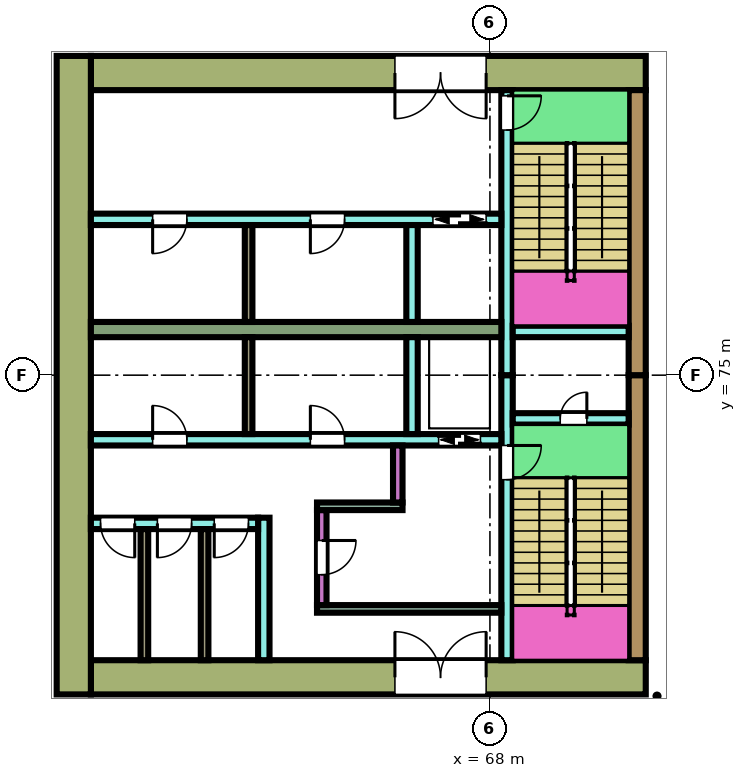
"""IFC4 building model, lengths in metres.
Left out: names, types, materials, properties, quantities, classifications, styles, units other than length and angle.
Written with IfcOpenShell. Run it as: python <this file> out.ifc"""

import sys

from ifc_helpers import new_model, si_unit, direction, frame, frame_2d, origin, place, context, subcontext, project, spatial, rectangle, extrude, element, fill, save


model = new_model("IFC4")
c1 = context("Model", 3, precision=1e-05, world=origin(), true_north=direction((0.0, 1.0)))
c2 = subcontext(c1, "Body", "Model", "MODEL_VIEW")
j1 = project(units=[si_unit("LENGTHUNIT", "METRE"), si_unit("PLANEANGLEUNIT", "RADIAN")], contexts=[c1])
p1 = place(None, origin())
s1 = spatial("IfcSite", under=j1, at=p1, CompositionType="ELEMENT")
p2 = place(p1, origin())
s2 = spatial("IfcBuilding", under=s1, at=p2, CompositionType="ELEMENT")
p3 = place(p2, frame((0.0, 0.0, -9.0)))
s3 = spatial("IfcBuildingStorey", under=s2, at=p3, CompositionType="ELEMENT", Elevation=-9.0)
p4 = place(p3, frame((72.1, 67.05, 0.0), z_axis=(0.0, 0.0, 1.0), x_axis=(-1.0, 0.0, 0.0)))
e1 = element("IfcWall", 1, at=p4, inside=s3, PredefinedType="SHEAR", context=c2, shape_type="SweptSolid", body=[
    extrude(rectangle(XDim=14.6, YDim=0.9, at=frame_2d((7.3, 0.0))), origin(), (0.0, 0.0, 1.0), 4.1),
])
p5 = place(p4, frame((4.2, 0.0, 0.0)))
e2 = element("IfcOpeningElement", 2, at=p5, cuts=e1, PredefinedType="OPENING", context=c2, shape_type="SweptSolid", body=[
    extrude(rectangle(XDim=2.4, YDim=2.4, at=frame_2d((1.2, 1.2))), frame((0.0, 0.46, 0.0), z_axis=(0.0, -1.0, 0.0), x_axis=(1.0, 0.0, 0.0)), (0.0, 0.0, 1.0), 0.92),
])
p6 = place(p3, frame((72.1, 82.95, 0.0), z_axis=(0.0, 0.0, 1.0), x_axis=(-1.0, 0.0, 0.0)))
e3 = element("IfcWall", 3, at=p6, inside=s3, PredefinedType="SHEAR", context=c2, shape_type="SweptSolid", body=[
    extrude(rectangle(XDim=14.6, YDim=0.9, at=frame_2d((7.3, 0.0))), origin(), (0.0, 0.0, 1.0), 4.1),
])
p7 = place(p6, frame((4.2, 0.0, 0.0)))
e4 = element("IfcOpeningElement", 4, at=p7, cuts=e3, PredefinedType="OPENING", context=c2, shape_type="SweptSolid", body=[
    extrude(rectangle(XDim=2.4, YDim=2.4, at=frame_2d((1.2, 1.2))), frame((0.0, 0.46, 0.0), z_axis=(0.0, -1.0, 0.0), x_axis=(1.0, 0.0, 0.0)), (0.0, 0.0, 1.0), 0.92),
])
for number, where, z_axis, x_axis in (
    (5, (71.875, 75.0, 0.0), (0.0, 0.0, 1.0), (0.0, -1.0, 0.0)),
    (6, (71.875, 82.5, 0.0), (0.0, 0.0, 1.0), (0.0, -1.0, 0.0)),
):
    element("IfcWall", number, at=place(p3, frame(where, z_axis=z_axis, x_axis=x_axis)), inside=s3, PredefinedType="SHEAR", context=c2, shape_type="SweptSolid", body=[
        extrude(rectangle(XDim=7.5, YDim=0.45, at=frame_2d((3.75, 0.0))), origin(), (0.0, 0.0, 1.0), 4.1),
    ])
p8 = place(p3, frame((57.05, 83.4, 0.0), z_axis=(0.0, 0.0, 1.0), x_axis=(0.0, -1.0, 0.0)))
e7 = element("IfcWall", 7, at=p8, inside=s3, PredefinedType="SHEAR", context=c2, shape_type="SweptSolid", body=[
    extrude(rectangle(XDim=16.8, YDim=0.9, at=frame_2d((8.4, 0.0))), origin(), (0.0, 0.0, 1.0), 4.1),
])
p9 = place(p3, frame((68.45, 75.0, 0.0), z_axis=(0.0, 0.0, 1.0), x_axis=(0.0, -1.0, 0.0)))
e8 = element("IfcWall", 8, at=p9, inside=s3, PredefinedType="SHEAR", context=c2, shape_type="SweptSolid", body=[
    extrude(rectangle(XDim=7.5, YDim=0.3, at=frame_2d((3.75, 0.0))), origin(), (0.0, 0.0, 1.0), 4.1),
])
p10 = place(p9, frame((1.85, 0.0, 0.0)))
e9 = element("IfcOpeningElement", 9, at=p10, cuts=e8, PredefinedType="OPENING", context=c2, shape_type="SweptSolid", body=[
    extrude(rectangle(XDim=0.9, YDim=2.1, at=frame_2d((0.45, 1.05))), frame((0.0, 0.16, 0.0), z_axis=(0.0, -1.0, 0.0), x_axis=(1.0, 0.0, 0.0)), (0.0, 0.0, 1.0), 0.32),
])
p11 = place(p3, frame((68.45, 82.5, 0.0), z_axis=(0.0, 0.0, 1.0), x_axis=(0.0, -1.0, 0.0)))
e10 = element("IfcWall", 10, at=p11, inside=s3, PredefinedType="SHEAR", context=c2, shape_type="SweptSolid", body=[
    extrude(rectangle(XDim=7.5, YDim=0.3, at=frame_2d((3.75, 0.0))), origin(), (0.0, 0.0, 1.0), 4.1),
])
p12 = place(p11, frame((0.15, 0.0, 0.0)))
e11 = element("IfcOpeningElement", 11, at=p12, cuts=e10, PredefinedType="OPENING", context=c2, shape_type="SweptSolid", body=[
    extrude(rectangle(XDim=0.9, YDim=2.1, at=frame_2d((0.45, 1.05))), frame((0.0, 0.16, 0.0), z_axis=(0.0, -1.0, 0.0), x_axis=(1.0, 0.0, 0.0)), (0.0, 0.0, 1.0), 0.32),
])
p13 = place(p3, frame((71.65, 73.85, 0.0), z_axis=(0.0, 0.0, 1.0), x_axis=(-1.0, 0.0, 0.0)))
e12 = element("IfcWall", 12, at=p13, inside=s3, PredefinedType="SHEAR", context=c2, shape_type="SweptSolid", body=[
    extrude(rectangle(XDim=3.05, YDim=0.3, at=frame_2d((1.525, 0.0))), origin(), (0.0, 0.0, 1.0), 4.1),
])
p14 = place(p13, frame((1.1, 0.0, 0.0)))
e13 = element("IfcOpeningElement", 13, at=p14, cuts=e12, PredefinedType="OPENING", context=c2, shape_type="SweptSolid", body=[
    extrude(rectangle(XDim=0.7, YDim=2.0, at=frame_2d((0.35, 1.0))), frame((0.0, 0.16, 0.0), z_axis=(0.0, -1.0, 0.0), x_axis=(1.0, 0.0, 0.0)), (0.0, 0.0, 1.0), 0.32),
])
p15 = place(p3, frame((71.65, 76.15, 0.0), z_axis=(0.0, 0.0, 1.0), x_axis=(-1.0, 0.0, 0.0)))
e14 = element("IfcWall", 14, at=p15, inside=s3, PredefinedType="SHEAR", context=c2, shape_type="SweptSolid", body=[
    extrude(rectangle(XDim=3.05, YDim=0.3, at=frame_2d((1.525, 0.0))), origin(), (0.0, 0.0, 1.0), 4.1),
])
p16 = place(p3, frame((68.3, 73.3, 0.0), z_axis=(0.0, 0.0, 1.0), x_axis=(-1.0, 0.0, 0.0)))
e15 = element("IfcWall", 15, at=p16, inside=s3, PredefinedType="SHEAR", context=c2, shape_type="SweptSolid", body=[
    extrude(rectangle(XDim=10.8, YDim=0.3, at=frame_2d((5.4, 0.0))), origin(), (0.0, 0.0, 1.0), 4.1),
])
p17 = place(p16, frame((0.55, 0.0, 0.0)))
e16 = element("IfcOpeningElement", 16, at=p17, cuts=e15, PredefinedType="OPENING", context=c2, shape_type="SweptSolid", body=[
    extrude(rectangle(XDim=1.1, YDim=2.1, at=frame_2d((0.55, 1.05))), frame((0.0, 0.16, 0.0), z_axis=(0.0, -1.0, 0.0), x_axis=(1.0, 0.0, 0.0)), (0.0, 0.0, 1.0), 0.32),
])
p18 = place(p16, frame((4.125, 0.0, 0.0)))
e17 = element("IfcOpeningElement", 17, at=p18, cuts=e15, PredefinedType="OPENING", context=c2, shape_type="SweptSolid", body=[
    extrude(rectangle(XDim=0.9, YDim=2.1, at=frame_2d((0.45, 1.05))), frame((0.0, 0.16, 0.0), z_axis=(0.0, -1.0, 0.0), x_axis=(1.0, 0.0, 0.0)), (0.0, 0.0, 1.0), 0.32),
])
p19 = place(p16, frame((8.275, 0.0, 0.0)))
e18 = element("IfcOpeningElement", 18, at=p19, cuts=e15, PredefinedType="OPENING", context=c2, shape_type="SweptSolid", body=[
    extrude(rectangle(XDim=0.9, YDim=2.1, at=frame_2d((0.45, 1.05))), frame((0.0, 0.16, 0.0), z_axis=(0.0, -1.0, 0.0), x_axis=(1.0, 0.0, 0.0)), (0.0, 0.0, 1.0), 0.32),
])
p20 = place(p3, frame((68.3, 76.2, 0.0), z_axis=(0.0, 0.0, 1.0), x_axis=(-1.0, 0.0, 0.0)))
e19 = element("IfcWall", 19, at=p20, inside=s3, PredefinedType="SHEAR", context=c2, shape_type="SweptSolid", body=[
    extrude(rectangle(XDim=10.8, YDim=0.4, at=frame_2d((5.4, 0.0))), origin(), (0.0, 0.0, 1.0), 4.1),
])
p21 = place(p3, frame((68.3, 79.1, 0.0), z_axis=(0.0, 0.0, 1.0), x_axis=(-1.0, 0.0, 0.0)))
e20 = element("IfcWall", 20, at=p21, inside=s3, PredefinedType="SHEAR", context=c2, shape_type="SweptSolid", body=[
    extrude(rectangle(XDim=10.8, YDim=0.3, at=frame_2d((5.4, 0.0))), origin(), (0.0, 0.0, 1.0), 4.1),
])
p22 = place(p21, frame((0.4, 0.0, 0.0)))
e21 = element("IfcOpeningElement", 21, at=p22, cuts=e20, PredefinedType="OPENING", context=c2, shape_type="SweptSolid", body=[
    extrude(rectangle(XDim=1.4, YDim=2.1, at=frame_2d((0.7, 1.05))), frame((0.0, 0.16, 0.0), z_axis=(0.0, -1.0, 0.0), x_axis=(1.0, 0.0, 0.0)), (0.0, 0.0, 1.0), 0.32),
])
p23 = place(p21, frame((4.125, 0.0, 0.0)))
e22 = element("IfcOpeningElement", 22, at=p23, cuts=e20, PredefinedType="OPENING", context=c2, shape_type="SweptSolid", body=[
    extrude(rectangle(XDim=0.9, YDim=2.1, at=frame_2d((0.45, 1.05))), frame((0.0, 0.16, 0.0), z_axis=(0.0, -1.0, 0.0), x_axis=(1.0, 0.0, 0.0)), (0.0, 0.0, 1.0), 0.32),
])
p24 = place(p21, frame((8.275, 0.0, 0.0)))
e23 = element("IfcOpeningElement", 23, at=p24, cuts=e20, PredefinedType="OPENING", context=c2, shape_type="SweptSolid", body=[
    extrude(rectangle(XDim=0.9, YDim=2.1, at=frame_2d((0.45, 1.05))), frame((0.0, 0.16, 0.0), z_axis=(0.0, -1.0, 0.0), x_axis=(1.0, 0.0, 0.0)), (0.0, 0.0, 1.0), 0.32),
])
for number, where, z_axis, x_axis in (
    (24, (65.95, 76.0, 0.0), (0.0, 0.0, 1.0), (0.0, -1.0, 0.0)),
    (25, (65.95, 78.95, 0.0), (0.0, 0.0, 1.0), (0.0, -1.0, 0.0)),
):
    element("IfcWall", number, at=place(p3, frame(where, z_axis=z_axis, x_axis=x_axis)), inside=s3, PredefinedType="SHEAR", context=c2, shape_type="SweptSolid", body=[
        extrude(rectangle(XDim=2.55, YDim=0.3, at=frame_2d((1.275, 0.0))), origin(), (0.0, 0.0, 1.0), 4.1),
    ])
p25 = place(p3, frame((68.3, 68.85, 0.0), z_axis=(0.0, 0.0, 1.0), x_axis=(-1.0, 0.0, 0.0)))
e26 = element("IfcWall", 26, at=p25, inside=s3, PredefinedType="SHEAR", context=c2, shape_type="SweptSolid", body=[
    extrude(rectangle(XDim=4.85, YDim=0.2, at=frame_2d((2.425, 0.0))), origin(), (0.0, 0.0, 1.0), 4.1),
])
p26 = place(p3, frame((63.575, 71.45, 0.0), z_axis=(0.0, 0.0, 1.0), x_axis=(0.0, -1.0, 0.0)))
e27 = element("IfcWall", 27, at=p26, inside=s3, PredefinedType="SHEAR", context=c2, shape_type="SweptSolid", body=[
    extrude(rectangle(XDim=2.5, YDim=0.25, at=frame_2d((1.25, 0.0))), origin(), (0.0, 0.0, 1.0), 4.1),
])
p27 = place(p26, frame((0.8, 0.0, 0.0)))
e28 = element("IfcOpeningElement", 28, at=p27, cuts=e27, PredefinedType="OPENING", context=c2, shape_type="SweptSolid", body=[
    extrude(rectangle(XDim=0.9, YDim=2.1, at=frame_2d((0.45, 1.05))), frame((0.0, 0.135, 0.0), z_axis=(0.0, -1.0, 0.0), x_axis=(1.0, 0.0, 0.0)), (0.0, 0.0, 1.0), 0.27),
])
p28 = place(p3, frame((65.7, 71.55, 0.0), z_axis=(0.0, 0.0, 1.0), x_axis=(-1.0, 0.0, 0.0)))
e29 = element("IfcWall", 29, at=p28, inside=s3, PredefinedType="SHEAR", context=c2, shape_type="SweptSolid", body=[
    extrude(rectangle(XDim=2.25, YDim=0.2, at=frame_2d((1.125, 0.0))), origin(), (0.0, 0.0, 1.0), 4.1),
])
p29 = place(p3, frame((65.575, 73.15, 0.0), z_axis=(0.0, 0.0, 1.0), x_axis=(0.0, -1.0, 0.0)))
e30 = element("IfcWall", 30, at=p29, inside=s3, PredefinedType="SHEAR", context=c2, shape_type="SweptSolid", body=[
    extrude(rectangle(XDim=1.5, YDim=0.25, at=frame_2d((0.75, 0.0))), origin(), (0.0, 0.0, 1.0), 4.1),
])
p30 = place(p3, frame((62.05, 71.25, 0.0), z_axis=(0.0, 0.0, 1.0), x_axis=(0.0, -1.0, 0.0)))
e31 = element("IfcWall", 31, at=p30, inside=s3, PredefinedType="SHEAR", context=c2, shape_type="SweptSolid", body=[
    extrude(rectangle(XDim=3.75, YDim=0.3, at=frame_2d((1.875, 0.0))), origin(), (0.0, 0.0, 1.0), 4.1),
])
p31 = place(p3, frame((61.9, 71.1, 0.0), z_axis=(0.0, 0.0, 1.0), x_axis=(-1.0, 0.0, 0.0)))
e32 = element("IfcWall", 32, at=p31, inside=s3, PredefinedType="SHEAR", context=c2, shape_type="SweptSolid", body=[
    extrude(rectangle(XDim=4.4, YDim=0.3, at=frame_2d((2.2, 0.0))), origin(), (0.0, 0.0, 1.0), 4.1),
])
p32 = place(p31, frame((0.254, 0.0, 0.0)))
e33 = element("IfcOpeningElement", 33, at=p32, cuts=e32, PredefinedType="OPENING", context=c2, shape_type="SweptSolid", body=[
    extrude(rectangle(XDim=0.9, YDim=2.1, at=frame_2d((0.45, 1.05))), frame((0.0, 0.16, 0.0), z_axis=(0.0, -1.0, 0.0), x_axis=(1.0, 0.0, 0.0)), (0.0, 0.0, 1.0), 0.32),
])
p33 = place(p31, frame((1.75, 0.0, 0.0)))
e34 = element("IfcOpeningElement", 34, at=p33, cuts=e32, PredefinedType="OPENING", context=c2, shape_type="SweptSolid", body=[
    extrude(rectangle(XDim=0.9, YDim=2.1, at=frame_2d((0.45, 1.05))), frame((0.0, 0.16, 0.0), z_axis=(0.0, -1.0, 0.0), x_axis=(1.0, 0.0, 0.0)), (0.0, 0.0, 1.0), 0.32),
])
p34 = place(p31, frame((3.246, 0.0, 0.0)))
e35 = element("IfcOpeningElement", 35, at=p34, cuts=e32, PredefinedType="OPENING", context=c2, shape_type="SweptSolid", body=[
    extrude(rectangle(XDim=0.9, YDim=2.1, at=frame_2d((0.45, 1.05))), frame((0.0, 0.16, 0.0), z_axis=(0.0, -1.0, 0.0), x_axis=(1.0, 0.0, 0.0)), (0.0, 0.0, 1.0), 0.32),
])
for number, where, z_axis, x_axis in (
    (36, (61.65, 76.0, 0.0), (0.0, 0.0, 1.0), (0.0, -1.0, 0.0)),
    (37, (61.65, 78.95, 0.0), (0.0, 0.0, 1.0), (0.0, -1.0, 0.0)),
):
    element("IfcWall", number, at=place(p3, frame(where, z_axis=z_axis, x_axis=x_axis)), inside=s3, PredefinedType="PARTITIONING", context=c2, shape_type="SweptSolid", body=[
        extrude(rectangle(XDim=2.55, YDim=0.2, at=frame_2d((1.275, 0.0))), origin(), (0.0, 0.0, 1.0), 4.1),
    ])
for number, where, z_axis, x_axis in (
    (38, (60.492, 70.95, 0.0), (0.0, 0.0, 1.0), (0.0, -1.0, 0.0)),
    (39, (58.908, 70.95, 0.0), (0.0, 0.0, 1.0), (0.0, -1.0, 0.0)),
):
    element("IfcWall", number, at=place(p3, frame(where, z_axis=z_axis, x_axis=x_axis)), inside=s3, PredefinedType="PARTITIONING", context=c2, shape_type="SweptSolid", body=[
        extrude(rectangle(XDim=3.45, YDim=0.2, at=frame_2d((1.725, 0.0))), origin(), (0.0, 0.0, 1.0), 4.1),
    ])
p35 = place(p14, frame((0.7, 0.0, 0.0), z_axis=(0.0, 0.0, 1.0), x_axis=(-1.0, 0.0, 0.0)))
e40 = element("IfcDoor", 40, at=p35, inside=s3, OperationType="SINGLE_SWING_RIGHT", PredefinedType="DOOR", context=c2, shape_type="SweptSolid", body=[
    extrude(rectangle(XDim=0.7, YDim=2.0, at=frame_2d((0.35, 1.0))), frame((0.0, 0.025, 0.0), z_axis=(0.0, -1.0, 0.0), x_axis=(1.0, 0.0, 0.0)), (0.0, 0.0, 1.0), 0.05),
])
fill(e13, e40)
p36 = place(p10, origin())
e41 = element("IfcDoor", 41, at=p36, inside=s3, OperationType="SINGLE_SWING_LEFT", PredefinedType="DOOR", context=c2, shape_type="SweptSolid", body=[
    extrude(rectangle(XDim=0.9, YDim=2.1, at=frame_2d((0.45, 1.05))), frame((0.0, 0.025, 0.0), z_axis=(0.0, -1.0, 0.0), x_axis=(1.0, 0.0, 0.0)), (0.0, 0.0, 1.0), 0.05),
])
fill(e9, e41)
p37 = place(p12, origin())
e42 = element("IfcDoor", 42, at=p37, inside=s3, OperationType="SINGLE_SWING_LEFT", PredefinedType="DOOR", context=c2, shape_type="SweptSolid", body=[
    extrude(rectangle(XDim=0.9, YDim=2.1, at=frame_2d((0.45, 1.05))), frame((0.0, 0.025, 0.0), z_axis=(0.0, -1.0, 0.0), x_axis=(1.0, 0.0, 0.0)), (0.0, 0.0, 1.0), 0.05),
])
fill(e11, e42)
p38 = place(p17, origin())
e43 = element("IfcDoor", 43, at=p38, inside=s3, OperationType="DOUBLE_DOOR_SLIDING", PredefinedType="DOOR", context=c2, shape_type="SweptSolid", body=[
    extrude(rectangle(XDim=1.1, YDim=2.1, at=frame_2d((0.55, 1.05))), frame((0.0, 0.025, 0.0), z_axis=(0.0, -1.0, 0.0), x_axis=(1.0, 0.0, 0.0)), (0.0, 0.0, 1.0), 0.05),
])
fill(e16, e43)
p39 = place(p18, frame((0.9, 0.0, 0.0), z_axis=(0.0, 0.0, 1.0), x_axis=(-1.0, 0.0, 0.0)))
e44 = element("IfcDoor", 44, at=p39, inside=s3, OperationType="SINGLE_SWING_LEFT", PredefinedType="DOOR", context=c2, shape_type="SweptSolid", body=[
    extrude(rectangle(XDim=0.9, YDim=2.1, at=frame_2d((0.45, 1.05))), frame((0.0, 0.025, 0.0), z_axis=(0.0, -1.0, 0.0), x_axis=(1.0, 0.0, 0.0)), (0.0, 0.0, 1.0), 0.05),
])
fill(e17, e44)
p40 = place(p19, frame((0.9, 0.0, 0.0), z_axis=(0.0, 0.0, 1.0), x_axis=(-1.0, 0.0, 0.0)))
e45 = element("IfcDoor", 45, at=p40, inside=s3, OperationType="SINGLE_SWING_LEFT", PredefinedType="DOOR", context=c2, shape_type="SweptSolid", body=[
    extrude(rectangle(XDim=0.9, YDim=2.1, at=frame_2d((0.45, 1.05))), frame((0.0, 0.025, 0.0), z_axis=(0.0, -1.0, 0.0), x_axis=(1.0, 0.0, 0.0)), (0.0, 0.0, 1.0), 0.05),
])
fill(e18, e45)
p41 = place(p22, origin())
e46 = element("IfcDoor", 46, at=p41, inside=s3, OperationType="DOUBLE_DOOR_SLIDING", PredefinedType="DOOR", context=c2, shape_type="SweptSolid", body=[
    extrude(rectangle(XDim=1.4, YDim=2.1, at=frame_2d((0.7, 1.05))), frame((0.0, 0.025, 0.0), z_axis=(0.0, -1.0, 0.0), x_axis=(1.0, 0.0, 0.0)), (0.0, 0.0, 1.0), 0.05),
])
fill(e21, e46)
p42 = place(p23, origin())
e47 = element("IfcDoor", 47, at=p42, inside=s3, OperationType="SINGLE_SWING_RIGHT", PredefinedType="DOOR", context=c2, shape_type="SweptSolid", body=[
    extrude(rectangle(XDim=0.9, YDim=2.1, at=frame_2d((0.45, 1.05))), frame((0.0, 0.025, 0.0), z_axis=(0.0, -1.0, 0.0), x_axis=(1.0, 0.0, 0.0)), (0.0, 0.0, 1.0), 0.05),
])
fill(e22, e47)
p43 = place(p24, origin())
e48 = element("IfcDoor", 48, at=p43, inside=s3, OperationType="SINGLE_SWING_RIGHT", PredefinedType="DOOR", context=c2, shape_type="SweptSolid", body=[
    extrude(rectangle(XDim=0.9, YDim=2.1, at=frame_2d((0.45, 1.05))), frame((0.0, 0.025, 0.0), z_axis=(0.0, -1.0, 0.0), x_axis=(1.0, 0.0, 0.0)), (0.0, 0.0, 1.0), 0.05),
])
fill(e23, e48)
p44 = place(p27, origin())
e49 = element("IfcDoor", 49, at=p44, inside=s3, OperationType="SINGLE_SWING_LEFT", PredefinedType="DOOR", context=c2, shape_type="SweptSolid", body=[
    extrude(rectangle(XDim=0.9, YDim=2.1, at=frame_2d((0.45, 1.05))), frame((0.0, 0.025, 0.0), z_axis=(0.0, -1.0, 0.0), x_axis=(1.0, 0.0, 0.0)), (0.0, 0.0, 1.0), 0.05),
])
fill(e28, e49)
p45 = place(p32, origin())
e50 = element("IfcDoor", 50, at=p45, inside=s3, OperationType="SINGLE_SWING_RIGHT", PredefinedType="DOOR", context=c2, shape_type="SweptSolid", body=[
    extrude(rectangle(XDim=0.9, YDim=2.1, at=frame_2d((0.45, 1.05))), frame((0.0, 0.025, 0.0), z_axis=(0.0, -1.0, 0.0), x_axis=(1.0, 0.0, 0.0)), (0.0, 0.0, 1.0), 0.05),
])
fill(e33, e50)
p46 = place(p33, origin())
e51 = element("IfcDoor", 51, at=p46, inside=s3, OperationType="SINGLE_SWING_RIGHT", PredefinedType="DOOR", context=c2, shape_type="SweptSolid", body=[
    extrude(rectangle(XDim=0.9, YDim=2.1, at=frame_2d((0.45, 1.05))), frame((0.0, 0.025, 0.0), z_axis=(0.0, -1.0, 0.0), x_axis=(1.0, 0.0, 0.0)), (0.0, 0.0, 1.0), 0.05),
])
fill(e34, e51)
p47 = place(p34, origin())
e52 = element("IfcDoor", 52, at=p47, inside=s3, OperationType="SINGLE_SWING_LEFT", PredefinedType="DOOR", context=c2, shape_type="SweptSolid", body=[
    extrude(rectangle(XDim=0.9, YDim=2.1, at=frame_2d((0.45, 1.05))), frame((0.0, 0.025, 0.0), z_axis=(0.0, -1.0, 0.0), x_axis=(1.0, 0.0, 0.0)), (0.0, 0.0, 1.0), 0.05),
])
fill(e35, e52)
p48 = place(p5, frame((2.4, 0.0, 0.0), z_axis=(0.0, 0.0, 1.0), x_axis=(-1.0, 0.0, 0.0)))
e53 = element("IfcDoor", 53, at=p48, inside=s3, OperationType="DOUBLE_DOOR_SINGLE_SWING", PredefinedType="DOOR", context=c2, shape_type="SweptSolid", body=[
    extrude(rectangle(XDim=2.4, YDim=2.4, at=frame_2d((1.2, 1.2))), frame((0.0, 0.025, 0.0), z_axis=(0.0, -1.0, 0.0), x_axis=(1.0, 0.0, 0.0)), (0.0, 0.0, 1.0), 0.05),
])
fill(e2, e53)
p49 = place(p7, origin())
e54 = element("IfcDoor", 54, at=p49, inside=s3, OperationType="DOUBLE_DOOR_SINGLE_SWING", PredefinedType="DOOR", context=c2, shape_type="SweptSolid", body=[
    extrude(rectangle(XDim=2.4, YDim=2.4, at=frame_2d((1.2, 1.2))), frame((0.0, 0.025, 0.0), z_axis=(0.0, -1.0, 0.0), x_axis=(1.0, 0.0, 0.0)), (0.0, 0.0, 1.0), 0.05),
])
fill(e4, e54)
save(model, sys.argv[1])
